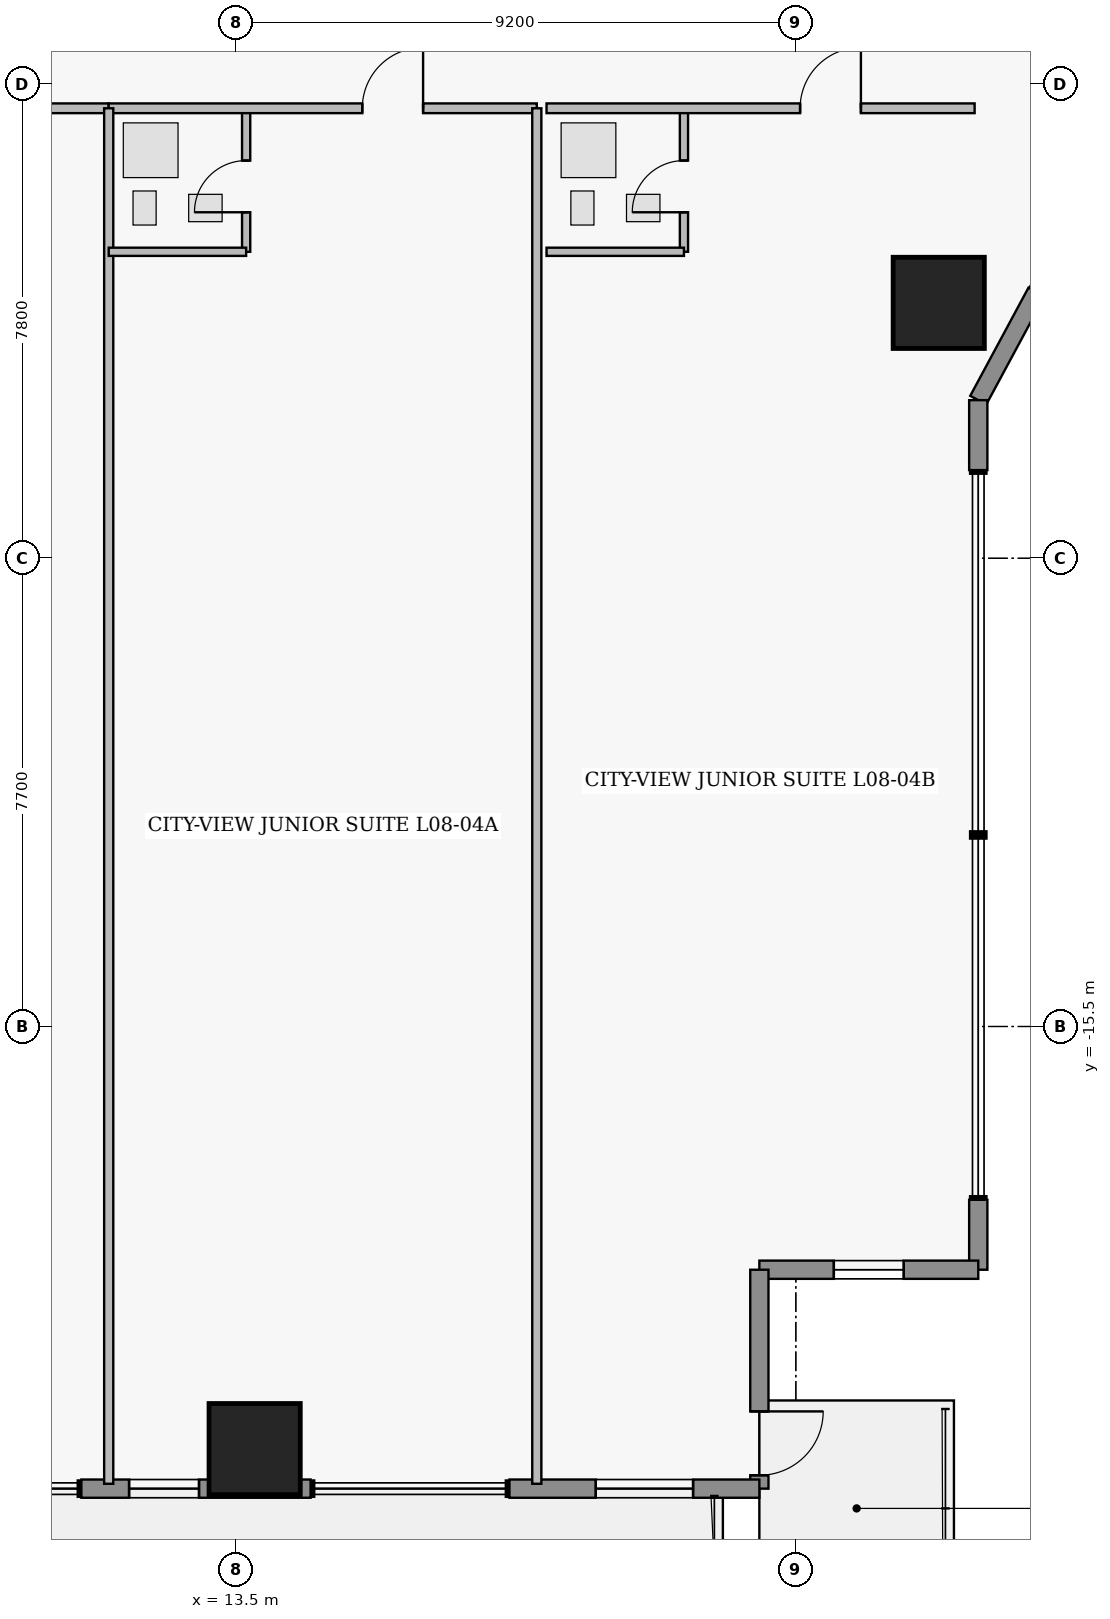
"""IFC4 building model, lengths in metres.
Left out: names, types, materials, properties, quantities, classifications, styles, units other than length and angle.
Written with IfcOpenShell. Run it as: python <this file> out.ifc"""

import sys

from ifc_helpers import new_model, si_unit, direction, frame, frame_2d, origin, origin_2d, place, context, subcontext, project, spatial, rectangle, extrude, element, fill, save


model = new_model("IFC4")
c1 = context("Model", 3, precision=1e-05, world=origin(), true_north=direction((0.0, 1.0)))
c2 = subcontext(c1, "Body", "Model", "MODEL_VIEW")
j1 = project(units=[si_unit("LENGTHUNIT", "METRE"), si_unit("PLANEANGLEUNIT", "RADIAN")], contexts=[c1])
p1 = place(None, origin())
s1 = spatial("IfcSite", under=j1, at=p1, CompositionType="ELEMENT")
p2 = place(p1, origin())
s2 = spatial("IfcBuilding", under=s1, at=p2, CompositionType="ELEMENT")
p3 = place(p2, frame((0.0, 0.0, 38.55)))
s3 = spatial("IfcBuildingStorey", under=s2, at=p3, CompositionType="ELEMENT", Elevation=38.55)
for number, where, z_axis, x_axis in (
    (1, (13.8, -22.45, 0.0), (0.0, 0.0, 1.0), (1.0, 0.0, 0.0)),
    (2, (25.05, -3.6, 0.0), (0.0, 0.0, 1.0), (1.0, 0.0, 0.0)),
):
    element("IfcColumn", number, at=place(p3, frame(where, z_axis=z_axis, x_axis=x_axis)), inside=s3, PredefinedType="COLUMN", context=c2, shape_type="SweptSolid", body=[
        extrude(rectangle(XDim=1.5, YDim=1.5, at=origin_2d()), origin(), (0.0, 0.0, 1.0), 3.65),
    ])
p4 = place(p3, frame((25.7, 5.2, 0.0), z_axis=(0.0, 0.0, 1.0), x_axis=(0.474109683532, -0.880465790352, 0.0)))
e3 = element("IfcWall", 3, at=p4, inside=s3, PredefinedType="STANDARD", context=c2, shape_type="SweptSolid", body=[
    extrude(rectangle(XDim=5.906, YDim=0.3, at=frame_2d((2.953, 0.0))), origin(), (0.0, 0.0, 1.0), 3.43),
])
p5 = place(p4, frame((2.324, 0.0, 0.95)))
e4 = element("IfcOpeningElement", 4, at=p5, cuts=e3, PredefinedType="OPENING", context=c2, shape_type="SweptSolid", body=[
    extrude(rectangle(XDim=1.15, YDim=1.55, at=frame_2d((0.575, 0.775))), frame((0.0, 0.16, 0.0), z_axis=(0.0, -1.0, 0.0), x_axis=(1.0, 0.0, 0.0)), (0.0, 0.0, 1.0), 0.32),
])
p6 = place(p3, frame((26.658, -3.421, 0.0), z_axis=(0.0, 0.0, 1.0), x_axis=(-0.474121438562, -0.88045946045, 0.0)))
e5 = element("IfcWall", 5, at=p6, inside=s3, PredefinedType="STANDARD", context=c2, shape_type="SweptSolid", body=[
    extrude(rectangle(XDim=2.021, YDim=0.3, at=frame_2d((1.01, 0.0))), origin(), (0.0, 0.0, 1.0), 3.43),
])
p7 = place(p3, frame((25.7, -5.2, 0.0), z_axis=(0.0, 0.0, 1.0), x_axis=(0.0, -1.0, 0.0)))
e6 = element("IfcWall", 6, at=p7, inside=s3, PredefinedType="STANDARD", context=c2, shape_type="SweptSolid", body=[
    extrude(rectangle(XDim=1.15, YDim=0.3, at=frame_2d((0.575, 0.0))), origin(), (0.0, 0.0, 1.0), 3.43),
])
p8 = place(p3, frame((25.7, -18.35, 0.0), z_axis=(0.0, 0.0, 1.0), x_axis=(0.0, -1.0, 0.0)))
e7 = element("IfcWall", 7, at=p8, inside=s3, PredefinedType="STANDARD", context=c2, shape_type="SweptSolid", body=[
    extrude(rectangle(XDim=1.15, YDim=0.3, at=frame_2d((0.575, 0.0))), origin(), (0.0, 0.0, 1.0), 3.43),
])
p9 = place(p3, frame((25.7, -19.5, 0.0), z_axis=(0.0, 0.0, 1.0), x_axis=(-1.0, 0.0, 0.0)))
e8 = element("IfcWall", 8, at=p9, inside=s3, PredefinedType="STANDARD", context=c2, shape_type="SweptSolid", body=[
    extrude(rectangle(XDim=3.6, YDim=0.3, at=frame_2d((1.8, 0.0))), origin(), (0.0, 0.0, 1.0), 3.43),
])
p10 = place(p9, frame((1.225, 0.0, 1.25)))
e9 = element("IfcOpeningElement", 9, at=p10, cuts=e8, PredefinedType="OPENING", context=c2, shape_type="SweptSolid", body=[
    extrude(rectangle(XDim=1.15, YDim=1.55, at=frame_2d((0.575, 0.775))), frame((0.0, 0.16, 0.0), z_axis=(0.0, -1.0, 0.0), x_axis=(1.0, 0.0, 0.0)), (0.0, 0.0, 1.0), 0.32),
])
p11 = place(p3, frame((22.1, -19.5, 0.0), z_axis=(0.0, 0.0, 1.0), x_axis=(0.0, -1.0, 0.0)))
e10 = element("IfcWall", 10, at=p11, inside=s3, PredefinedType="STANDARD", context=c2, shape_type="SweptSolid", body=[
    extrude(rectangle(XDim=3.6, YDim=0.3, at=frame_2d((1.8, 0.0))), origin(), (0.0, 0.0, 1.0), 3.43),
])
p12 = place(p11, frame((2.33, 0.0, 0.0)))
e11 = element("IfcOpeningElement", 11, at=p12, cuts=e10, PredefinedType="OPENING", context=c2, shape_type="SweptSolid", body=[
    extrude(rectangle(XDim=1.05, YDim=2.2, at=frame_2d((0.525, 1.1))), frame((0.0, 0.16, 0.0), z_axis=(0.0, -1.0, 0.0), x_axis=(1.0, 0.0, 0.0)), (0.0, 0.0, 1.0), 0.32),
])
p13 = place(p3, frame((22.1, -23.1, 0.0), z_axis=(0.0, 0.0, 1.0), x_axis=(-1.0, 0.0, 0.0)))
e12 = element("IfcWall", 12, at=p13, inside=s3, PredefinedType="STANDARD", context=c2, shape_type="SweptSolid", body=[
    extrude(rectangle(XDim=4.11, YDim=0.3, at=frame_2d((2.055, 0.0))), origin(), (0.0, 0.0, 1.0), 3.43),
])
p14 = place(p13, frame((1.09, 0.0, 0.85)))
e13 = element("IfcOpeningElement", 13, at=p14, cuts=e12, PredefinedType="OPENING", context=c2, shape_type="SweptSolid", body=[
    extrude(rectangle(XDim=1.6, YDim=1.8, at=frame_2d((0.8, 0.9))), frame((0.0, 0.16, 0.0), z_axis=(0.0, -1.0, 0.0), x_axis=(1.0, 0.0, 0.0)), (0.0, 0.0, 1.0), 0.32),
])
p15 = place(p3, frame((14.72, -23.1, 0.0), z_axis=(0.0, 0.0, 1.0), x_axis=(-1.0, 0.0, 0.0)))
e14 = element("IfcWall", 14, at=p15, inside=s3, PredefinedType="STANDARD", context=c2, shape_type="SweptSolid", body=[
    extrude(rectangle(XDim=3.77, YDim=0.3, at=frame_2d((1.885, 0.0))), origin(), (0.0, 0.0, 1.0), 3.43),
])
p16 = place(p15, frame((1.835, 0.0, 0.95)))
e15 = element("IfcOpeningElement", 15, at=p16, cuts=e14, PredefinedType="OPENING", context=c2, shape_type="SweptSolid", body=[
    extrude(rectangle(XDim=1.15, YDim=1.55, at=frame_2d((0.575, 0.775))), frame((0.0, 0.16, 0.0), z_axis=(0.0, -1.0, 0.0), x_axis=(1.0, 0.0, 0.0)), (0.0, 0.0, 1.0), 0.32),
])
p17 = place(p3, frame((2.4, -0.4, 0.0), z_axis=(0.0, 0.0, 1.0), x_axis=(1.0, 0.0, 0.0)))
e16 = element("IfcWall", 16, at=p17, inside=s3, PredefinedType="PARTITIONING", context=c2, shape_type="SweptSolid", body=[
    extrude(rectangle(XDim=9.0, YDim=0.16, at=frame_2d((4.5, 0.0))), origin(), (0.0, 0.0, 1.0), 3.43),
])
p18 = place(p17, frame((5.15, 0.0, 0.0)))
e17 = element("IfcOpeningElement", 17, at=p18, cuts=e16, PredefinedType="OPENING", context=c2, shape_type="SweptSolid", body=[
    extrude(rectangle(XDim=1.0, YDim=2.15, at=frame_2d((0.5, 1.075))), frame((0.0, 0.09, 0.0), z_axis=(0.0, -1.0, 0.0), x_axis=(1.0, 0.0, 0.0)), (0.0, 0.0, 1.0), 0.18),
])
p19 = place(p3, frame((13.66, -2.76, 0.0), z_axis=(0.0, 0.0, 1.0), x_axis=(0.0, 1.0, 0.0)))
e18 = element("IfcWall", 18, at=p19, inside=s3, PredefinedType="PLUMBINGWALL", context=c2, shape_type="SweptSolid", body=[
    extrude(rectangle(XDim=2.36, YDim=0.135, at=frame_2d((1.18, 0.0))), origin(), (0.0, 0.0, 1.0), 2.668),
])
p20 = place(p19, frame((0.65, 0.0, 0.0)))
e19 = element("IfcOpeningElement", 19, at=p20, cuts=e18, PredefinedType="OPENING", context=c2, shape_type="SweptSolid", body=[
    extrude(rectangle(XDim=0.85, YDim=2.1, at=frame_2d((0.425, 1.05))), frame((0.0, 0.077, 0.0), z_axis=(0.0, -1.0, 0.0), x_axis=(1.0, 0.0, 0.0)), (0.0, 0.0, 1.0), 0.155),
])
p21 = place(p3, frame((11.4, -0.4, 0.0), z_axis=(0.0, 0.0, 1.0), x_axis=(1.0, 0.0, 0.0)))
e20 = element("IfcWall", 20, at=p21, inside=s3, PredefinedType="PARTITIONING", context=c2, shape_type="SweptSolid", body=[
    extrude(rectangle(XDim=7.04, YDim=0.16, at=frame_2d((3.52, 0.0))), origin(), (0.0, 0.0, 1.0), 3.43),
])
p22 = place(p21, frame((4.17, 0.0, 0.0)))
e21 = element("IfcOpeningElement", 21, at=p22, cuts=e20, PredefinedType="OPENING", context=c2, shape_type="SweptSolid", body=[
    extrude(rectangle(XDim=1.0, YDim=2.15, at=frame_2d((0.5, 1.075))), frame((0.0, 0.09, 0.0), z_axis=(0.0, -1.0, 0.0), x_axis=(1.0, 0.0, 0.0)), (0.0, 0.0, 1.0), 0.18),
])
p23 = place(p3, frame((20.86, -2.76, 0.0), z_axis=(0.0, 0.0, 1.0), x_axis=(0.0, 1.0, 0.0)))
e22 = element("IfcWall", 22, at=p23, inside=s3, PredefinedType="PLUMBINGWALL", context=c2, shape_type="SweptSolid", body=[
    extrude(rectangle(XDim=2.36, YDim=0.135, at=frame_2d((1.18, 0.0))), origin(), (0.0, 0.0, 1.0), 3.43),
])
p24 = place(p23, frame((0.65, 0.0, 0.0)))
e23 = element("IfcOpeningElement", 23, at=p24, cuts=e22, PredefinedType="OPENING", context=c2, shape_type="SweptSolid", body=[
    extrude(rectangle(XDim=0.85, YDim=2.1, at=frame_2d((0.425, 1.05))), frame((0.0, 0.077, 0.0), z_axis=(0.0, -1.0, 0.0), x_axis=(1.0, 0.0, 0.0)), (0.0, 0.0, 1.0), 0.155),
])
p25 = place(p3, frame((18.6, -0.4, 0.0), z_axis=(0.0, 0.0, 1.0), x_axis=(1.0, 0.0, 0.0)))
e24 = element("IfcWall", 24, at=p25, inside=s3, PredefinedType="PARTITIONING", context=c2, shape_type="SweptSolid", body=[
    extrude(rectangle(XDim=7.04, YDim=0.16, at=frame_2d((3.52, 0.0))), origin(), (0.0, 0.0, 1.0), 3.43),
])
p26 = place(p25, frame((4.17, 0.0, 0.0)))
e25 = element("IfcOpeningElement", 25, at=p26, cuts=e24, PredefinedType="OPENING", context=c2, shape_type="SweptSolid", body=[
    extrude(rectangle(XDim=1.0, YDim=2.15, at=frame_2d((0.5, 1.075))), frame((0.0, 0.09, 0.0), z_axis=(0.0, -1.0, 0.0), x_axis=(1.0, 0.0, 0.0)), (0.0, 0.0, 1.0), 0.18),
])
p27 = place(p3, frame((11.4, -23.02, 0.0), z_axis=(0.0, 0.0, 1.0), x_axis=(0.0, 1.0, 0.0)))
e26 = element("IfcWall", 26, at=p27, inside=s3, PredefinedType="PARTITIONING", context=c2, shape_type="SweptSolid", body=[
    extrude(rectangle(XDim=22.62, YDim=0.15, at=frame_2d((11.31, 0.0))), origin(), (0.0, 0.0, 1.0), 3.43),
])
p28 = place(p3, frame((11.4, -2.76, 0.0), z_axis=(0.0, 0.0, 1.0), x_axis=(1.0, 0.0, 0.0)))
e27 = element("IfcWall", 27, at=p28, inside=s3, PredefinedType="PLUMBINGWALL", context=c2, shape_type="SweptSolid", body=[
    extrude(rectangle(XDim=2.26, YDim=0.135, at=frame_2d((1.13, 0.0))), origin(), (0.0, 0.0, 1.0), 3.43),
])
p29 = place(p3, frame((18.44, -23.02, 0.0), z_axis=(0.0, 0.0, 1.0), x_axis=(0.0, 1.0, 0.0)))
e28 = element("IfcWall", 28, at=p29, inside=s3, PredefinedType="PARTITIONING", context=c2, shape_type="SweptSolid", body=[
    extrude(rectangle(XDim=22.62, YDim=0.15, at=frame_2d((11.31, 0.0))), origin(), (0.0, 0.0, 1.0), 3.43),
])
p30 = place(p3, frame((18.6, -2.76, 0.0), z_axis=(0.0, 0.0, 1.0), x_axis=(1.0, 0.0, 0.0)))
e29 = element("IfcWall", 29, at=p30, inside=s3, PredefinedType="PLUMBINGWALL", context=c2, shape_type="SweptSolid", body=[
    extrude(rectangle(XDim=2.26, YDim=0.135, at=frame_2d((1.13, 0.0))), origin(), (0.0, 0.0, 1.0), 3.43),
])
p31 = place(p10, origin())
e30 = element("IfcWindow", 30, at=p31, inside=s3, PartitioningType="SINGLE_PANEL", PredefinedType="WINDOW", context=c2, shape_type="SweptSolid", body=[
    extrude(rectangle(XDim=1.15, YDim=1.55, at=frame_2d((0.575, 0.775))), frame((0.0, 0.03, 0.0), z_axis=(0.0, -1.0, 0.0), x_axis=(1.0, 0.0, 0.0)), (0.0, 0.0, 1.0), 0.06),
])
fill(e9, e30)
p32 = place(p12, origin())
e31 = element("IfcDoor", 31, at=p32, inside=s3, OperationType="SINGLE_SWING_LEFT", PredefinedType="DOOR", context=c2, shape_type="SweptSolid", body=[
    extrude(rectangle(XDim=1.05, YDim=2.2, at=frame_2d((0.525, 1.1))), frame((0.0, 0.025, 0.0), z_axis=(0.0, -1.0, 0.0), x_axis=(1.0, 0.0, 0.0)), (0.0, 0.0, 1.0), 0.05),
])
fill(e11, e31)
p33 = place(p14, origin())
e32 = element("IfcWindow", 32, at=p33, inside=s3, PartitioningType="SINGLE_PANEL", PredefinedType="WINDOW", context=c2, shape_type="SweptSolid", body=[
    extrude(rectangle(XDim=1.6, YDim=1.8, at=frame_2d((0.8, 0.9))), frame((0.0, 0.03, 0.0), z_axis=(0.0, -1.0, 0.0), x_axis=(1.0, 0.0, 0.0)), (0.0, 0.0, 1.0), 0.06),
])
fill(e13, e32)
p34 = place(p16, origin())
e33 = element("IfcWindow", 33, at=p34, inside=s3, PartitioningType="SINGLE_PANEL", PredefinedType="WINDOW", context=c2, shape_type="SweptSolid", body=[
    extrude(rectangle(XDim=1.15, YDim=1.55, at=frame_2d((0.575, 0.775))), frame((0.0, 0.03, 0.0), z_axis=(0.0, -1.0, 0.0), x_axis=(1.0, 0.0, 0.0)), (0.0, 0.0, 1.0), 0.06),
])
fill(e15, e33)
p35 = place(p20, origin())
e34 = element("IfcDoor", 34, at=p35, inside=s3, OperationType="SINGLE_SWING_LEFT", PredefinedType="DOOR", context=c2, shape_type="SweptSolid", body=[
    extrude(rectangle(XDim=0.85, YDim=2.1, at=frame_2d((0.425, 1.05))), frame((0.0, 0.025, 0.0), z_axis=(0.0, -1.0, 0.0), x_axis=(1.0, 0.0, 0.0)), (0.0, 0.0, 1.0), 0.05),
])
fill(e19, e34)
p36 = place(p22, origin())
e35 = element("IfcDoor", 35, at=p36, inside=s3, OperationType="SINGLE_SWING_RIGHT", PredefinedType="DOOR", context=c2, shape_type="SweptSolid", body=[
    extrude(rectangle(XDim=1.0, YDim=2.15, at=frame_2d((0.5, 1.075))), frame((0.0, 0.025, 0.0), z_axis=(0.0, -1.0, 0.0), x_axis=(1.0, 0.0, 0.0)), (0.0, 0.0, 1.0), 0.05),
])
fill(e21, e35)
p37 = place(p24, origin())
e36 = element("IfcDoor", 36, at=p37, inside=s3, OperationType="SINGLE_SWING_LEFT", PredefinedType="DOOR", context=c2, shape_type="SweptSolid", body=[
    extrude(rectangle(XDim=0.85, YDim=2.1, at=frame_2d((0.425, 1.05))), frame((0.0, 0.025, 0.0), z_axis=(0.0, -1.0, 0.0), x_axis=(1.0, 0.0, 0.0)), (0.0, 0.0, 1.0), 0.05),
])
fill(e23, e36)
p38 = place(p26, origin())
e37 = element("IfcDoor", 37, at=p38, inside=s3, OperationType="SINGLE_SWING_RIGHT", PredefinedType="DOOR", context=c2, shape_type="SweptSolid", body=[
    extrude(rectangle(XDim=1.0, YDim=2.15, at=frame_2d((0.5, 1.075))), frame((0.0, 0.025, 0.0), z_axis=(0.0, -1.0, 0.0), x_axis=(1.0, 0.0, 0.0)), (0.0, 0.0, 1.0), 0.05),
])
fill(e25, e37)
save(model, sys.argv[1])
